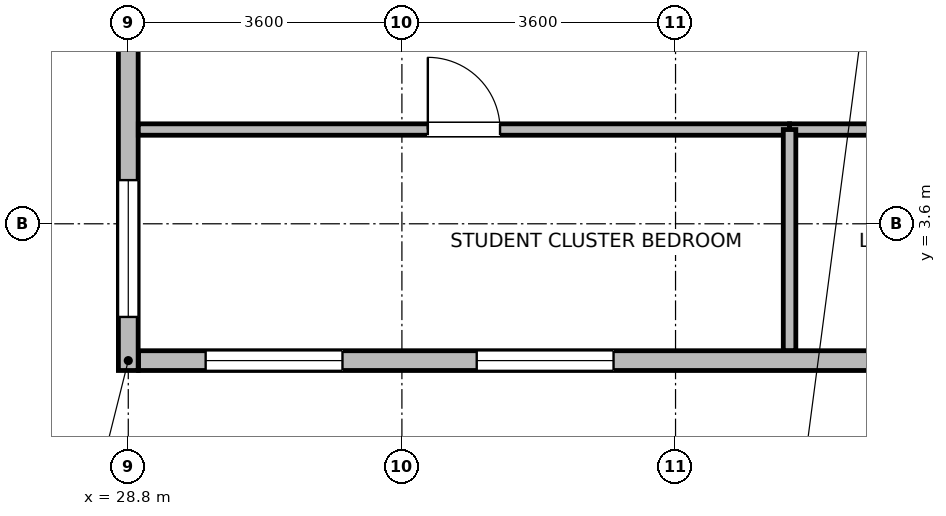
"""IFC4 building model, lengths in metres.
Left out: names, types, materials, properties, quantities, classifications, styles, units other than length and angle.
Written with IfcOpenShell. Run it as: python <this file> out.ifc"""

import sys

from ifc_helpers import new_model, si_unit, direction, frame, frame_2d, origin, place, context, subcontext, project, spatial, rectangle, extrude, element, fill, save


model = new_model("IFC4")
c1 = context("Model", 3, precision=1e-05, world=origin(), true_north=direction((0.0, 1.0)))
c2 = subcontext(c1, "Body", "Model", "MODEL_VIEW")
j1 = project(units=[si_unit("LENGTHUNIT", "METRE"), si_unit("PLANEANGLEUNIT", "RADIAN")], contexts=[c1])
p1 = place(None, origin())
s1 = spatial("IfcSite", under=j1, at=p1, CompositionType="ELEMENT")
p2 = place(p1, origin())
s2 = spatial("IfcBuilding", under=s1, at=p2, CompositionType="ELEMENT")
p3 = place(p2, frame((0.0, 0.0, 40.1)))
s3 = spatial("IfcBuildingStorey", under=s2, at=p3, CompositionType="ELEMENT", Elevation=40.1)
p4 = place(p3, frame((57.465, 1.8, 0.0), z_axis=(0.0, 0.0, 1.0), x_axis=(-1.0, 0.0, 0.0)))
e1 = element("IfcWall", 1, at=p4, inside=s3, PredefinedType="STANDARD", context=c2, shape_type="SweptSolid", body=[
    extrude(rectangle(XDim=28.53, YDim=0.26, at=frame_2d((14.265, 0.0))), origin(), (0.0, 0.0, 1.0), 3.43),
])
p5 = place(p4, frame((0.883, 0.0, 0.85)))
e2 = element("IfcOpeningElement", 2, at=p5, cuts=e1, PredefinedType="OPENING", context=c2, shape_type="SweptSolid", body=[
    extrude(rectangle(XDim=1.8, YDim=1.85, at=frame_2d((0.9, 0.925))), frame((0.0, 0.14, 0.0), z_axis=(0.0, -1.0, 0.0), x_axis=(1.0, 0.0, 0.0)), (0.0, 0.0, 1.0), 0.28),
])
p6 = place(p4, frame((4.449, 0.0, 0.85)))
e3 = element("IfcOpeningElement", 3, at=p6, cuts=e1, PredefinedType="OPENING", context=c2, shape_type="SweptSolid", body=[
    extrude(rectangle(XDim=1.8, YDim=1.85, at=frame_2d((0.9, 0.925))), frame((0.0, 0.14, 0.0), z_axis=(0.0, -1.0, 0.0), x_axis=(1.0, 0.0, 0.0)), (0.0, 0.0, 1.0), 0.28),
])
p7 = place(p4, frame((8.016, 0.0, 0.85)))
e4 = element("IfcOpeningElement", 4, at=p7, cuts=e1, PredefinedType="OPENING", context=c2, shape_type="SweptSolid", body=[
    extrude(rectangle(XDim=1.8, YDim=1.85, at=frame_2d((0.9, 0.925))), frame((0.0, 0.14, 0.0), z_axis=(0.0, -1.0, 0.0), x_axis=(1.0, 0.0, 0.0)), (0.0, 0.0, 1.0), 0.28),
])
p8 = place(p4, frame((11.582, 0.0, 0.85)))
e5 = element("IfcOpeningElement", 5, at=p8, cuts=e1, PredefinedType="OPENING", context=c2, shape_type="SweptSolid", body=[
    extrude(rectangle(XDim=1.8, YDim=1.85, at=frame_2d((0.9, 0.925))), frame((0.0, 0.14, 0.0), z_axis=(0.0, -1.0, 0.0), x_axis=(1.0, 0.0, 0.0)), (0.0, 0.0, 1.0), 0.28),
])
p9 = place(p4, frame((15.148, 0.0, 0.85)))
e6 = element("IfcOpeningElement", 6, at=p9, cuts=e1, PredefinedType="OPENING", context=c2, shape_type="SweptSolid", body=[
    extrude(rectangle(XDim=1.8, YDim=1.85, at=frame_2d((0.9, 0.925))), frame((0.0, 0.14, 0.0), z_axis=(0.0, -1.0, 0.0), x_axis=(1.0, 0.0, 0.0)), (0.0, 0.0, 1.0), 0.28),
])
p10 = place(p4, frame((22.281, 0.0, 0.85)))
e7 = element("IfcOpeningElement", 7, at=p10, cuts=e1, PredefinedType="OPENING", context=c2, shape_type="SweptSolid", body=[
    extrude(rectangle(XDim=1.8, YDim=1.85, at=frame_2d((0.9, 0.925))), frame((0.0, 0.14, 0.0), z_axis=(0.0, -1.0, 0.0), x_axis=(1.0, 0.0, 0.0)), (0.0, 0.0, 1.0), 0.28),
])
p11 = place(p4, frame((25.847, 0.0, 0.85)))
e8 = element("IfcOpeningElement", 8, at=p11, cuts=e1, PredefinedType="OPENING", context=c2, shape_type="SweptSolid", body=[
    extrude(rectangle(XDim=1.8, YDim=1.85, at=frame_2d((0.9, 0.925))), frame((0.0, 0.14, 0.0), z_axis=(0.0, -1.0, 0.0), x_axis=(1.0, 0.0, 0.0)), (0.0, 0.0, 1.0), 0.28),
])
p12 = place(p3, frame((28.8, 1.67, 0.0), z_axis=(0.0, 0.0, 1.0), x_axis=(0.0, 1.0, 0.0)))
e9 = element("IfcWall", 9, at=p12, inside=s3, PredefinedType="STANDARD", context=c2, shape_type="SweptSolid", body=[
    extrude(rectangle(XDim=19.254, YDim=0.26, at=frame_2d((9.627, 0.0))), origin(), (0.0, 0.0, 1.0), 3.43),
])
p13 = place(p12, frame((0.705, 0.0, 0.85)))
e10 = element("IfcOpeningElement", 10, at=p13, cuts=e9, PredefinedType="OPENING", context=c2, shape_type="SweptSolid", body=[
    extrude(rectangle(XDim=1.8, YDim=1.85, at=frame_2d((0.9, 0.925))), frame((0.0, 0.14, 0.0), z_axis=(0.0, -1.0, 0.0), x_axis=(1.0, 0.0, 0.0)), (0.0, 0.0, 1.0), 0.28),
])
p14 = place(p12, frame((7.123, 0.0, 0.85)))
e11 = element("IfcOpeningElement", 11, at=p14, cuts=e9, PredefinedType="OPENING", context=c2, shape_type="SweptSolid", body=[
    extrude(rectangle(XDim=1.8, YDim=1.85, at=frame_2d((0.9, 0.925))), frame((0.0, 0.14, 0.0), z_axis=(0.0, -1.0, 0.0), x_axis=(1.0, 0.0, 0.0)), (0.0, 0.0, 1.0), 0.28),
])
p15 = place(p12, frame((10.332, 0.0, 0.85)))
e12 = element("IfcOpeningElement", 12, at=p15, cuts=e9, PredefinedType="OPENING", context=c2, shape_type="SweptSolid", body=[
    extrude(rectangle(XDim=1.8, YDim=1.85, at=frame_2d((0.9, 0.925))), frame((0.0, 0.14, 0.0), z_axis=(0.0, -1.0, 0.0), x_axis=(1.0, 0.0, 0.0)), (0.0, 0.0, 1.0), 0.28),
])
p16 = place(p12, frame((13.541, 0.0, 0.85)))
e13 = element("IfcOpeningElement", 13, at=p16, cuts=e9, PredefinedType="OPENING", context=c2, shape_type="SweptSolid", body=[
    extrude(rectangle(XDim=1.8, YDim=1.85, at=frame_2d((0.9, 0.925))), frame((0.0, 0.14, 0.0), z_axis=(0.0, -1.0, 0.0), x_axis=(1.0, 0.0, 0.0)), (0.0, 0.0, 1.0), 0.28),
])
p17 = place(p12, frame((16.75, 0.0, 0.85)))
e14 = element("IfcOpeningElement", 14, at=p17, cuts=e9, PredefinedType="OPENING", context=c2, shape_type="SweptSolid", body=[
    extrude(rectangle(XDim=1.8, YDim=1.85, at=frame_2d((0.9, 0.925))), frame((0.0, 0.14, 0.0), z_axis=(0.0, -1.0, 0.0), x_axis=(1.0, 0.0, 0.0)), (0.0, 0.0, 1.0), 0.28),
])
p18 = place(p3, frame((37.5, 4.84, 0.0), z_axis=(0.0, 0.0, 1.0), x_axis=(1.0, 0.0, 0.0)))
e15 = element("IfcWall", 15, at=p18, inside=s3, PredefinedType="PARTITIONING", context=c2, shape_type="SweptSolid", body=[
    extrude(rectangle(XDim=9.2, YDim=0.15, at=frame_2d((4.6, 0.0))), origin(), (0.0, 0.0, 1.0), 3.43),
])
p19 = place(p18, frame((4.125, 0.0, 0.0)))
e16 = element("IfcOpeningElement", 16, at=p19, cuts=e15, PredefinedType="OPENING", context=c2, shape_type="SweptSolid", body=[
    extrude(rectangle(XDim=0.95, YDim=2.1, at=frame_2d((0.475, 1.05))), frame((0.0, 0.085, 0.0), z_axis=(0.0, -1.0, 0.0), x_axis=(1.0, 0.0, 0.0)), (0.0, 0.0, 1.0), 0.17),
])
p20 = place(p3, frame((28.932, 4.84, 0.0), z_axis=(0.0, 0.0, 1.0), x_axis=(1.0, 0.0, 0.0)))
e17 = element("IfcWall", 17, at=p20, inside=s3, PredefinedType="PARTITIONING", context=c2, shape_type="SweptSolid", body=[
    extrude(rectangle(XDim=8.568, YDim=0.15, at=frame_2d((4.284, 0.0))), origin(), (0.0, 0.0, 1.0), 3.43),
])
p21 = place(p20, frame((3.809, 0.0, 0.0)))
e18 = element("IfcOpeningElement", 18, at=p21, cuts=e17, PredefinedType="OPENING", context=c2, shape_type="SweptSolid", body=[
    extrude(rectangle(XDim=0.95, YDim=2.1, at=frame_2d((0.475, 1.05))), frame((0.0, 0.085, 0.0), z_axis=(0.0, -1.0, 0.0), x_axis=(1.0, 0.0, 0.0)), (0.0, 0.0, 1.0), 0.17),
])
p22 = place(p3, frame((37.5, 1.932, 0.0), z_axis=(0.0, 0.0, 1.0), x_axis=(0.0, 1.0, 0.0)))
e19 = element("IfcWall", 19, at=p22, inside=s3, PredefinedType="PARTITIONING", context=c2, shape_type="SweptSolid", body=[
    extrude(rectangle(XDim=2.908, YDim=0.165, at=frame_2d((1.454, 0.0))), origin(), (0.0, 0.0, 1.0), 3.43),
])
p23 = place(p10, origin())
e20 = element("IfcWindow", 20, at=p23, inside=s3, PartitioningType="SINGLE_PANEL", PredefinedType="WINDOW", context=c2, shape_type="SweptSolid", body=[
    extrude(rectangle(XDim=1.8, YDim=1.85, at=frame_2d((0.9, 0.925))), frame((0.0, 0.03, 0.0), z_axis=(0.0, -1.0, 0.0), x_axis=(1.0, 0.0, 0.0)), (0.0, 0.0, 1.0), 0.06),
])
fill(e7, e20)
p24 = place(p11, origin())
e21 = element("IfcWindow", 21, at=p24, inside=s3, PartitioningType="SINGLE_PANEL", PredefinedType="WINDOW", context=c2, shape_type="SweptSolid", body=[
    extrude(rectangle(XDim=1.8, YDim=1.85, at=frame_2d((0.9, 0.925))), frame((0.0, 0.03, 0.0), z_axis=(0.0, -1.0, 0.0), x_axis=(1.0, 0.0, 0.0)), (0.0, 0.0, 1.0), 0.06),
])
fill(e8, e21)
p25 = place(p13, origin())
e22 = element("IfcWindow", 22, at=p25, inside=s3, PartitioningType="SINGLE_PANEL", PredefinedType="WINDOW", context=c2, shape_type="SweptSolid", body=[
    extrude(rectangle(XDim=1.8, YDim=1.85, at=frame_2d((0.9, 0.925))), frame((0.0, 0.03, 0.0), z_axis=(0.0, -1.0, 0.0), x_axis=(1.0, 0.0, 0.0)), (0.0, 0.0, 1.0), 0.06),
])
fill(e10, e22)
p26 = place(p21, origin())
e23 = element("IfcDoor", 23, at=p26, inside=s3, OperationType="SINGLE_SWING_LEFT", PredefinedType="DOOR", context=c2, shape_type="SweptSolid", body=[
    extrude(rectangle(XDim=0.95, YDim=2.1, at=frame_2d((0.475, 1.05))), frame((0.0, 0.025, 0.0), z_axis=(0.0, -1.0, 0.0), x_axis=(1.0, 0.0, 0.0)), (0.0, 0.0, 1.0), 0.05),
])
fill(e18, e23)
save(model, sys.argv[1])
